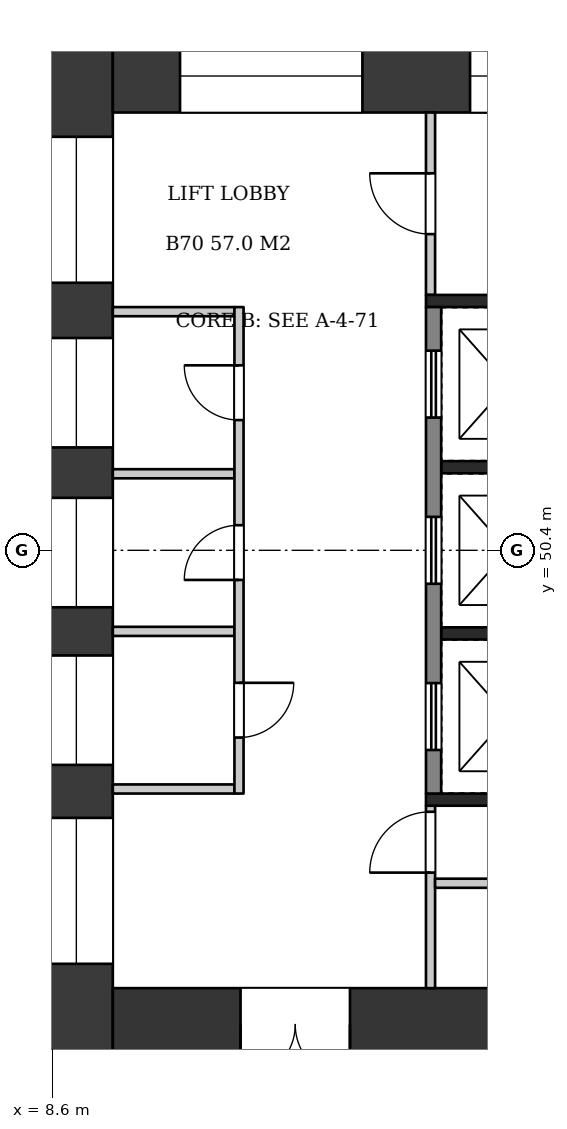
"""IFC4 building model, lengths in metres.
Left out: names, types, materials, properties, quantities, classifications, styles, units other than length and angle.
Written with IfcOpenShell. Run it as: python <this file> out.ifc"""

import sys

from ifc_helpers import new_model, si_unit, direction, frame, frame_2d, origin, place, context, subcontext, project, spatial, rectangle, extrude, element, fill, save


model = new_model("IFC4")
c1 = context("Model", 3, precision=1e-05, world=origin(), true_north=direction((0.0, 1.0)))
c2 = subcontext(c1, "Body", "Model", "MODEL_VIEW")
j1 = project(units=[si_unit("LENGTHUNIT", "METRE"), si_unit("PLANEANGLEUNIT", "RADIAN")], contexts=[c1])
p1 = place(None, origin())
s1 = spatial("IfcSite", under=j1, at=p1, CompositionType="ELEMENT")
p2 = place(p1, origin())
s2 = spatial("IfcBuilding", under=s1, at=p2, CompositionType="ELEMENT")
p3 = place(p2, frame((0.0, 0.0, 266.7)))
s3 = spatial("IfcBuildingStorey", under=s2, at=p3, CompositionType="ELEMENT", Elevation=266.7)
p4 = place(p3, frame((9.0, 58.8, 0.0), z_axis=(0.0, 0.0, 1.0), x_axis=(0.0, -1.0, 0.0)))
e1 = element("IfcWall", 1, at=p4, inside=s3, PredefinedType="SHEAR", context=c2, shape_type="SweptSolid", body=[
    extrude(rectangle(XDim=16.8, YDim=1.2, at=frame_2d((8.4, 0.0))), origin(), (0.0, 0.0, 1.0), 3.22),
])
p5 = place(p4, frame((1.6, 0.0, 0.6)))
e2 = element("IfcOpeningElement", 2, at=p5, cuts=e1, PredefinedType="OPENING", context=c2, shape_type="SweptSolid", body=[
    extrude(rectangle(XDim=2.4, YDim=2.1, at=frame_2d((1.2, 1.05))), frame((0.0, 0.61, 0.0), z_axis=(0.0, -1.0, 0.0), x_axis=(1.0, 0.0, 0.0)), (0.0, 0.0, 1.0), 1.22),
])
p6 = place(p4, frame((4.908, 0.0, 1.6)))
e3 = element("IfcOpeningElement", 3, at=p6, cuts=e1, PredefinedType="OPENING", context=c2, shape_type="SweptSolid", body=[
    extrude(rectangle(XDim=1.8, YDim=1.2, at=frame_2d((0.9, 0.6))), frame((0.0, 0.61, 0.0), z_axis=(0.0, -1.0, 0.0), x_axis=(1.0, 0.0, 0.0)), (0.0, 0.0, 1.0), 1.22),
])
p7 = place(p4, frame((7.537, 0.0, 1.6)))
e4 = element("IfcOpeningElement", 4, at=p7, cuts=e1, PredefinedType="OPENING", context=c2, shape_type="SweptSolid", body=[
    extrude(rectangle(XDim=1.8, YDim=1.2, at=frame_2d((0.9, 0.6))), frame((0.0, 0.61, 0.0), z_axis=(0.0, -1.0, 0.0), x_axis=(1.0, 0.0, 0.0)), (0.0, 0.0, 1.0), 1.22),
])
p8 = place(p4, frame((10.129, 0.0, 1.6)))
e5 = element("IfcOpeningElement", 5, at=p8, cuts=e1, PredefinedType="OPENING", context=c2, shape_type="SweptSolid", body=[
    extrude(rectangle(XDim=1.8, YDim=1.2, at=frame_2d((0.9, 0.6))), frame((0.0, 0.61, 0.0), z_axis=(0.0, -1.0, 0.0), x_axis=(1.0, 0.0, 0.0)), (0.0, 0.0, 1.0), 1.22),
])
p9 = place(p4, frame((12.8, 0.0, 0.6)))
e6 = element("IfcOpeningElement", 6, at=p9, cuts=e1, PredefinedType="OPENING", context=c2, shape_type="SweptSolid", body=[
    extrude(rectangle(XDim=2.4, YDim=2.1, at=frame_2d((1.2, 1.05))), frame((0.0, 0.61, 0.0), z_axis=(0.0, -1.0, 0.0), x_axis=(1.0, 0.0, 0.0)), (0.0, 0.0, 1.0), 1.22),
])
p10 = place(p3, frame((9.6, 58.2, 0.0), z_axis=(0.0, 0.0, 1.0), x_axis=(1.0, 0.0, 0.0)))
e7 = element("IfcWall", 7, at=p10, inside=s3, PredefinedType="SHEAR", context=c2, shape_type="SweptSolid", body=[
    extrude(rectangle(XDim=14.4, YDim=1.2, at=frame_2d((7.2, 0.0))), origin(), (0.0, 0.0, 1.0), 3.22),
])
p11 = place(p10, frame((1.105, 0.0, 0.6)))
e8 = element("IfcOpeningElement", 8, at=p11, cuts=e7, PredefinedType="OPENING", context=c2, shape_type="SweptSolid", body=[
    extrude(rectangle(XDim=3.0, YDim=2.1, at=frame_2d((1.5, 1.05))), frame((0.0, 0.61, 0.0), z_axis=(0.0, -1.0, 0.0), x_axis=(1.0, 0.0, 0.0)), (0.0, 0.0, 1.0), 1.22),
])
p12 = place(p10, frame((5.875, 0.0, 0.6)))
e9 = element("IfcOpeningElement", 9, at=p12, cuts=e7, PredefinedType="OPENING", context=c2, shape_type="SweptSolid", body=[
    extrude(rectangle(XDim=2.4, YDim=2.1, at=frame_2d((1.2, 1.05))), frame((0.0, 0.61, 0.0), z_axis=(0.0, -1.0, 0.0), x_axis=(1.0, 0.0, 0.0)), (0.0, 0.0, 1.0), 1.22),
])
p13 = place(p10, frame((9.993, 0.0, 0.5)))
e10 = element("IfcOpeningElement", 10, at=p13, cuts=e7, PredefinedType="OPENING", context=c2, shape_type="SweptSolid", body=[
    extrude(rectangle(XDim=1.2, YDim=2.4, at=frame_2d((0.6, 1.2))), frame((0.0, 0.61, 0.0), z_axis=(0.0, -1.0, 0.0), x_axis=(1.0, 0.0, 0.0)), (0.0, 0.0, 1.0), 1.22),
])
p14 = place(p10, frame((12.197, 0.0, 0.5)))
e11 = element("IfcOpeningElement", 11, at=p14, cuts=e7, PredefinedType="OPENING", context=c2, shape_type="SweptSolid", body=[
    extrude(rectangle(XDim=1.2, YDim=2.4, at=frame_2d((0.6, 1.2))), frame((0.0, 0.61, 0.0), z_axis=(0.0, -1.0, 0.0), x_axis=(1.0, 0.0, 0.0)), (0.0, 0.0, 1.0), 1.22),
])
p15 = place(p3, frame((9.6, 42.6, 0.0), z_axis=(0.0, 0.0, 1.0), x_axis=(1.0, 0.0, 0.0)))
e12 = element("IfcWall", 12, at=p15, inside=s3, PredefinedType="SHEAR", context=c2, shape_type="SweptSolid", body=[
    extrude(rectangle(XDim=14.4, YDim=1.2, at=frame_2d((7.2, 0.0))), origin(), (0.0, 0.0, 1.0), 3.22),
])
p16 = place(p15, frame((2.1, 0.0, 0.0)))
e13 = element("IfcOpeningElement", 13, at=p16, cuts=e12, PredefinedType="OPENING", context=c2, shape_type="SweptSolid", body=[
    extrude(rectangle(XDim=1.8, YDim=2.1, at=frame_2d((0.9, 1.05))), frame((0.0, 0.61, 0.0), z_axis=(0.0, -1.0, 0.0), x_axis=(1.0, 0.0, 0.0)), (0.0, 0.0, 1.0), 1.22),
])
for number, where, z_axis, x_axis in (
    (14, (9.6, 54.325, 0.0), (0.0, 0.0, 1.0), (1.0, 0.0, 0.0)),
    (15, (9.6, 46.475, 0.0), (0.0, 0.0, 1.0), (1.0, 0.0, 0.0)),
    (16, (9.6, 51.659, 0.0), (0.0, 0.0, 1.0), (1.0, 0.0, 0.0)),
    (17, (9.6, 49.067, 0.0), (0.0, 0.0, 1.0), (1.0, 0.0, 0.0)),
):
    element("IfcWall", number, at=place(p3, frame(where, z_axis=z_axis, x_axis=x_axis)), inside=s3, PredefinedType="PARTITIONING", context=c2, shape_type="SweptSolid", body=[
        extrude(rectangle(XDim=2.0, YDim=0.15, at=frame_2d((1.0, 0.0))), origin(), (0.0, 0.0, 1.0), 3.22),
    ])
p17 = place(p3, frame((11.675, 54.4, 0.0), z_axis=(0.0, 0.0, 1.0), x_axis=(0.0, -1.0, 0.0)))
e18 = element("IfcWall", 18, at=p17, inside=s3, PredefinedType="PARTITIONING", context=c2, shape_type="SweptSolid", body=[
    extrude(rectangle(XDim=8.0, YDim=0.15, at=frame_2d((4.0, 0.0))), origin(), (0.0, 0.0, 1.0), 3.22),
])
p18 = place(p17, frame((0.958, 0.0, 0.0)))
e19 = element("IfcOpeningElement", 19, at=p18, cuts=e18, PredefinedType="OPENING", context=c2, shape_type="SweptSolid", body=[
    extrude(rectangle(XDim=0.9, YDim=2.1, at=frame_2d((0.45, 1.05))), frame((0.0, 0.085, 0.0), z_axis=(0.0, -1.0, 0.0), x_axis=(1.0, 0.0, 0.0)), (0.0, 0.0, 1.0), 0.17),
])
p19 = place(p17, frame((3.587, 0.0, 0.0)))
e20 = element("IfcOpeningElement", 20, at=p19, cuts=e18, PredefinedType="OPENING", context=c2, shape_type="SweptSolid", body=[
    extrude(rectangle(XDim=0.9, YDim=2.1, at=frame_2d((0.45, 1.05))), frame((0.0, 0.085, 0.0), z_axis=(0.0, -1.0, 0.0), x_axis=(1.0, 0.0, 0.0)), (0.0, 0.0, 1.0), 0.17),
])
p20 = place(p17, frame((6.179, 0.0, 0.0)))
e21 = element("IfcOpeningElement", 21, at=p20, cuts=e18, PredefinedType="OPENING", context=c2, shape_type="SweptSolid", body=[
    extrude(rectangle(XDim=0.9, YDim=2.1, at=frame_2d((0.45, 1.05))), frame((0.0, 0.085, 0.0), z_axis=(0.0, -1.0, 0.0), x_axis=(1.0, 0.0, 0.0)), (0.0, 0.0, 1.0), 0.17),
])
for number, where, z_axis, x_axis in (
    (22, (15.0, 51.767, 0.0), (0.0, 0.0, 1.0), (1.0, 0.0, 0.0)),
    (23, (15.0, 49.033, 0.0), (0.0, 0.0, 1.0), (1.0, 0.0, 0.0)),
):
    element("IfcWall", number, at=place(p3, frame(where, z_axis=z_axis, x_axis=x_axis)), inside=s3, PredefinedType="SHEAR", context=c2, shape_type="SweptSolid", body=[
        extrude(rectangle(XDim=1.9, YDim=0.2, at=frame_2d((0.95, 0.0))), origin(), (0.0, 0.0, 1.0), 3.22),
    ])
p21 = place(p3, frame((14.875, 54.4, 0.0), z_axis=(0.0, 0.0, 1.0), x_axis=(0.0, -1.0, 0.0)))
e24 = element("IfcWall", 24, at=p21, inside=s3, PredefinedType="SHEAR", context=c2, shape_type="SweptSolid", body=[
    extrude(rectangle(XDim=8.0, YDim=0.25, at=frame_2d((4.0, 0.0))), origin(), (0.0, 0.0, 1.0), 3.22),
])
p22 = place(p21, frame((0.717, 0.0, 0.0)))
e25 = element("IfcOpeningElement", 25, at=p22, cuts=e24, PredefinedType="OPENING", context=c2, shape_type="SweptSolid", body=[
    extrude(rectangle(XDim=1.1, YDim=2.1, at=frame_2d((0.55, 1.05))), frame((0.0, 0.135, 0.0), z_axis=(0.0, -1.0, 0.0), x_axis=(1.0, 0.0, 0.0)), (0.0, 0.0, 1.0), 0.27),
])
p23 = place(p21, frame((3.45, 0.0, 0.0)))
e26 = element("IfcOpeningElement", 26, at=p23, cuts=e24, PredefinedType="OPENING", context=c2, shape_type="SweptSolid", body=[
    extrude(rectangle(XDim=1.1, YDim=2.1, at=frame_2d((0.55, 1.05))), frame((0.0, 0.135, 0.0), z_axis=(0.0, -1.0, 0.0), x_axis=(1.0, 0.0, 0.0)), (0.0, 0.0, 1.0), 0.27),
])
p24 = place(p21, frame((6.183, 0.0, 0.0)))
e27 = element("IfcOpeningElement", 27, at=p24, cuts=e24, PredefinedType="OPENING", context=c2, shape_type="SweptSolid", body=[
    extrude(rectangle(XDim=1.1, YDim=2.1, at=frame_2d((0.55, 1.05))), frame((0.0, 0.135, 0.0), z_axis=(0.0, -1.0, 0.0), x_axis=(1.0, 0.0, 0.0)), (0.0, 0.0, 1.0), 0.27),
])
p25 = place(p3, frame((14.75, 54.5, 0.0), z_axis=(0.0, 0.0, 1.0), x_axis=(1.0, 0.0, 0.0)))
e28 = element("IfcWall", 28, at=p25, inside=s3, PredefinedType="SHEAR", context=c2, shape_type="SweptSolid", body=[
    extrude(rectangle(XDim=2.4, YDim=0.2, at=frame_2d((1.2, 0.0))), origin(), (0.0, 0.0, 1.0), 3.22),
])
p26 = place(p3, frame((14.825, 57.6, 0.0), z_axis=(0.0, 0.0, 1.0), x_axis=(0.0, -1.0, 0.0)))
e29 = element("IfcWall", 29, at=p26, inside=s3, PredefinedType="PARTITIONING", context=c2, shape_type="SweptSolid", body=[
    extrude(rectangle(XDim=3.0, YDim=0.15, at=frame_2d((1.5, 0.0))), origin(), (0.0, 0.0, 1.0), 3.22),
])
p27 = place(p26, frame((1.0, 0.0, 0.0)))
e30 = element("IfcOpeningElement", 30, at=p27, cuts=e29, PredefinedType="OPENING", context=c2, shape_type="SweptSolid", body=[
    extrude(rectangle(XDim=1.0, YDim=2.1, at=frame_2d((0.5, 1.05))), frame((0.0, 0.085, 0.0), z_axis=(0.0, -1.0, 0.0), x_axis=(1.0, 0.0, 0.0)), (0.0, 0.0, 1.0), 0.17),
])
p28 = place(p3, frame((14.75, 46.3, 0.0), z_axis=(0.0, 0.0, 1.0), x_axis=(1.0, 0.0, 0.0)))
e31 = element("IfcWall", 31, at=p28, inside=s3, PredefinedType="SHEAR", context=c2, shape_type="SweptSolid", body=[
    extrude(rectangle(XDim=9.25, YDim=0.2, at=frame_2d((4.625, 0.0))), origin(), (0.0, 0.0, 1.0), 3.22),
])
p29 = place(p3, frame((14.825, 46.2, 0.0), z_axis=(0.0, 0.0, 1.0), x_axis=(0.0, -1.0, 0.0)))
e32 = element("IfcWall", 32, at=p29, inside=s3, PredefinedType="PARTITIONING", context=c2, shape_type="SweptSolid", body=[
    extrude(rectangle(XDim=3.0, YDim=0.15, at=frame_2d((1.5, 0.0))), origin(), (0.0, 0.0, 1.0), 3.22),
])
p30 = place(p29, frame((0.1, 0.0, 0.0)))
e33 = element("IfcOpeningElement", 33, at=p30, cuts=e32, PredefinedType="OPENING", context=c2, shape_type="SweptSolid", body=[
    extrude(rectangle(XDim=1.0, YDim=2.1, at=frame_2d((0.5, 1.05))), frame((0.0, 0.085, 0.0), z_axis=(0.0, -1.0, 0.0), x_axis=(1.0, 0.0, 0.0)), (0.0, 0.0, 1.0), 0.17),
])
p31 = place(p3, frame((14.9, 44.925, 0.0), z_axis=(0.0, 0.0, 1.0), x_axis=(1.0, 0.0, 0.0)))
e34 = element("IfcWall", 34, at=p31, inside=s3, PredefinedType="PARTITIONING", context=c2, shape_type="SweptSolid", body=[
    extrude(rectangle(XDim=9.1, YDim=0.15, at=frame_2d((4.55, 0.0))), origin(), (0.0, 0.0, 1.0), 3.22),
])
p32 = place(p31, frame((1.04, 0.0, 0.0)))
e35 = element("IfcOpeningElement", 35, at=p32, cuts=e34, PredefinedType="OPENING", context=c2, shape_type="SweptSolid", body=[
    extrude(rectangle(XDim=1.0, YDim=2.1, at=frame_2d((0.5, 1.05))), frame((0.0, 0.085, 0.0), z_axis=(0.0, -1.0, 0.0), x_axis=(1.0, 0.0, 0.0)), (0.0, 0.0, 1.0), 0.17),
])
p33 = place(p31, frame((4.32, 0.0, 0.0)))
e36 = element("IfcOpeningElement", 36, at=p33, cuts=e34, PredefinedType="OPENING", context=c2, shape_type="SweptSolid", body=[
    extrude(rectangle(XDim=0.9, YDim=2.1, at=frame_2d((0.45, 1.05))), frame((0.0, 0.085, 0.0), z_axis=(0.0, -1.0, 0.0), x_axis=(1.0, 0.0, 0.0)), (0.0, 0.0, 1.0), 0.17),
])
p34 = place(p31, frame((7.28, 0.0, 0.0)))
e37 = element("IfcOpeningElement", 37, at=p34, cuts=e34, PredefinedType="OPENING", context=c2, shape_type="SweptSolid", body=[
    extrude(rectangle(XDim=1.0, YDim=2.1, at=frame_2d((0.5, 1.05))), frame((0.0, 0.085, 0.0), z_axis=(0.0, -1.0, 0.0), x_axis=(1.0, 0.0, 0.0)), (0.0, 0.0, 1.0), 0.17),
])
p35 = place(p16, frame((1.8, 0.0, 0.0), z_axis=(0.0, 0.0, 1.0), x_axis=(-1.0, 0.0, 0.0)))
e38 = element("IfcDoor", 38, at=p35, inside=s3, OperationType="DOUBLE_DOOR_SINGLE_SWING", PredefinedType="DOOR", context=c2, shape_type="SweptSolid", body=[
    extrude(rectangle(XDim=1.8, YDim=2.1, at=frame_2d((0.9, 1.05))), frame((0.0, 0.025, 0.0), z_axis=(0.0, -1.0, 0.0), x_axis=(1.0, 0.0, 0.0)), (0.0, 0.0, 1.0), 0.05),
])
fill(e13, e38)
p36 = place(p18, frame((0.9, 0.0, 0.0), z_axis=(0.0, 0.0, 1.0), x_axis=(-1.0, 0.0, 0.0)))
e39 = element("IfcDoor", 39, at=p36, inside=s3, OperationType="SINGLE_SWING_RIGHT", PredefinedType="DOOR", context=c2, shape_type="SweptSolid", body=[
    extrude(rectangle(XDim=0.9, YDim=2.1, at=frame_2d((0.45, 1.05))), frame((0.0, 0.025, 0.0), z_axis=(0.0, -1.0, 0.0), x_axis=(1.0, 0.0, 0.0)), (0.0, 0.0, 1.0), 0.05),
])
fill(e19, e39)
p37 = place(p19, frame((0.9, 0.0, 0.0), z_axis=(0.0, 0.0, 1.0), x_axis=(-1.0, 0.0, 0.0)))
e40 = element("IfcDoor", 40, at=p37, inside=s3, OperationType="SINGLE_SWING_LEFT", PredefinedType="DOOR", context=c2, shape_type="SweptSolid", body=[
    extrude(rectangle(XDim=0.9, YDim=2.1, at=frame_2d((0.45, 1.05))), frame((0.0, 0.025, 0.0), z_axis=(0.0, -1.0, 0.0), x_axis=(1.0, 0.0, 0.0)), (0.0, 0.0, 1.0), 0.05),
])
fill(e20, e40)
p38 = place(p20, origin())
e41 = element("IfcDoor", 41, at=p38, inside=s3, OperationType="SINGLE_SWING_LEFT", PredefinedType="DOOR", context=c2, shape_type="SweptSolid", body=[
    extrude(rectangle(XDim=0.9, YDim=2.1, at=frame_2d((0.45, 1.05))), frame((0.0, 0.025, 0.0), z_axis=(0.0, -1.0, 0.0), x_axis=(1.0, 0.0, 0.0)), (0.0, 0.0, 1.0), 0.05),
])
fill(e21, e41)
p39 = place(p22, origin())
e42 = element("IfcDoor", 42, at=p39, inside=s3, OperationType="DOUBLE_DOOR_SLIDING", PredefinedType="DOOR", context=c2, shape_type="SweptSolid", body=[
    extrude(rectangle(XDim=1.1, YDim=2.1, at=frame_2d((0.55, 1.05))), frame((0.0, 0.025, 0.0), z_axis=(0.0, -1.0, 0.0), x_axis=(1.0, 0.0, 0.0)), (0.0, 0.0, 1.0), 0.05),
])
fill(e25, e42)
p40 = place(p23, origin())
e43 = element("IfcDoor", 43, at=p40, inside=s3, OperationType="DOUBLE_DOOR_SLIDING", PredefinedType="DOOR", context=c2, shape_type="SweptSolid", body=[
    extrude(rectangle(XDim=1.1, YDim=2.1, at=frame_2d((0.55, 1.05))), frame((0.0, 0.025, 0.0), z_axis=(0.0, -1.0, 0.0), x_axis=(1.0, 0.0, 0.0)), (0.0, 0.0, 1.0), 0.05),
])
fill(e26, e43)
p41 = place(p24, origin())
e44 = element("IfcDoor", 44, at=p41, inside=s3, OperationType="DOUBLE_DOOR_SLIDING", PredefinedType="DOOR", context=c2, shape_type="SweptSolid", body=[
    extrude(rectangle(XDim=1.1, YDim=2.1, at=frame_2d((0.55, 1.05))), frame((0.0, 0.025, 0.0), z_axis=(0.0, -1.0, 0.0), x_axis=(1.0, 0.0, 0.0)), (0.0, 0.0, 1.0), 0.05),
])
fill(e27, e44)
p42 = place(p27, frame((1.0, 0.0, 0.0), z_axis=(0.0, 0.0, 1.0), x_axis=(-1.0, 0.0, 0.0)))
e45 = element("IfcDoor", 45, at=p42, inside=s3, OperationType="SINGLE_SWING_RIGHT", PredefinedType="DOOR", context=c2, shape_type="SweptSolid", body=[
    extrude(rectangle(XDim=1.0, YDim=2.1, at=frame_2d((0.5, 1.05))), frame((0.0, 0.025, 0.0), z_axis=(0.0, -1.0, 0.0), x_axis=(1.0, 0.0, 0.0)), (0.0, 0.0, 1.0), 0.05),
])
fill(e30, e45)
p43 = place(p30, frame((1.0, 0.0, 0.0), z_axis=(0.0, 0.0, 1.0), x_axis=(-1.0, 0.0, 0.0)))
e46 = element("IfcDoor", 46, at=p43, inside=s3, OperationType="SINGLE_SWING_LEFT", PredefinedType="DOOR", context=c2, shape_type="SweptSolid", body=[
    extrude(rectangle(XDim=1.0, YDim=2.1, at=frame_2d((0.5, 1.05))), frame((0.0, 0.025, 0.0), z_axis=(0.0, -1.0, 0.0), x_axis=(1.0, 0.0, 0.0)), (0.0, 0.0, 1.0), 0.05),
])
fill(e33, e46)
p44 = place(p5, origin())
e47 = element("IfcWindow", 47, at=p44, inside=s3, PartitioningType="SINGLE_PANEL", PredefinedType="WINDOW", context=c2, shape_type="SweptSolid", body=[
    extrude(rectangle(XDim=2.4, YDim=2.1, at=frame_2d((1.2, 1.05))), frame((0.0, 0.03, 0.0), z_axis=(0.0, -1.0, 0.0), x_axis=(1.0, 0.0, 0.0)), (0.0, 0.0, 1.0), 0.06),
])
fill(e2, e47)
p45 = place(p6, origin())
e48 = element("IfcWindow", 48, at=p45, inside=s3, PartitioningType="SINGLE_PANEL", PredefinedType="WINDOW", context=c2, shape_type="SweptSolid", body=[
    extrude(rectangle(XDim=1.8, YDim=1.2, at=frame_2d((0.9, 0.6))), frame((0.0, 0.03, 0.0), z_axis=(0.0, -1.0, 0.0), x_axis=(1.0, 0.0, 0.0)), (0.0, 0.0, 1.0), 0.06),
])
fill(e3, e48)
p46 = place(p7, origin())
e49 = element("IfcWindow", 49, at=p46, inside=s3, PartitioningType="SINGLE_PANEL", PredefinedType="WINDOW", context=c2, shape_type="SweptSolid", body=[
    extrude(rectangle(XDim=1.8, YDim=1.2, at=frame_2d((0.9, 0.6))), frame((0.0, 0.03, 0.0), z_axis=(0.0, -1.0, 0.0), x_axis=(1.0, 0.0, 0.0)), (0.0, 0.0, 1.0), 0.06),
])
fill(e4, e49)
p47 = place(p8, origin())
e50 = element("IfcWindow", 50, at=p47, inside=s3, PartitioningType="SINGLE_PANEL", PredefinedType="WINDOW", context=c2, shape_type="SweptSolid", body=[
    extrude(rectangle(XDim=1.8, YDim=1.2, at=frame_2d((0.9, 0.6))), frame((0.0, 0.03, 0.0), z_axis=(0.0, -1.0, 0.0), x_axis=(1.0, 0.0, 0.0)), (0.0, 0.0, 1.0), 0.06),
])
fill(e5, e50)
p48 = place(p9, origin())
e51 = element("IfcWindow", 51, at=p48, inside=s3, PartitioningType="SINGLE_PANEL", PredefinedType="WINDOW", context=c2, shape_type="SweptSolid", body=[
    extrude(rectangle(XDim=2.4, YDim=2.1, at=frame_2d((1.2, 1.05))), frame((0.0, 0.03, 0.0), z_axis=(0.0, -1.0, 0.0), x_axis=(1.0, 0.0, 0.0)), (0.0, 0.0, 1.0), 0.06),
])
fill(e6, e51)
p49 = place(p11, origin())
e52 = element("IfcWindow", 52, at=p49, inside=s3, PartitioningType="SINGLE_PANEL", PredefinedType="WINDOW", context=c2, shape_type="SweptSolid", body=[
    extrude(rectangle(XDim=3.0, YDim=2.1, at=frame_2d((1.5, 1.05))), frame((0.0, 0.03, 0.0), z_axis=(0.0, -1.0, 0.0), x_axis=(1.0, 0.0, 0.0)), (0.0, 0.0, 1.0), 0.06),
])
fill(e8, e52)
p50 = place(p12, origin())
e53 = element("IfcWindow", 53, at=p50, inside=s3, PartitioningType="SINGLE_PANEL", PredefinedType="WINDOW", context=c2, shape_type="SweptSolid", body=[
    extrude(rectangle(XDim=2.4, YDim=2.1, at=frame_2d((1.2, 1.05))), frame((0.0, 0.03, 0.0), z_axis=(0.0, -1.0, 0.0), x_axis=(1.0, 0.0, 0.0)), (0.0, 0.0, 1.0), 0.06),
])
fill(e9, e53)
save(model, sys.argv[1])
